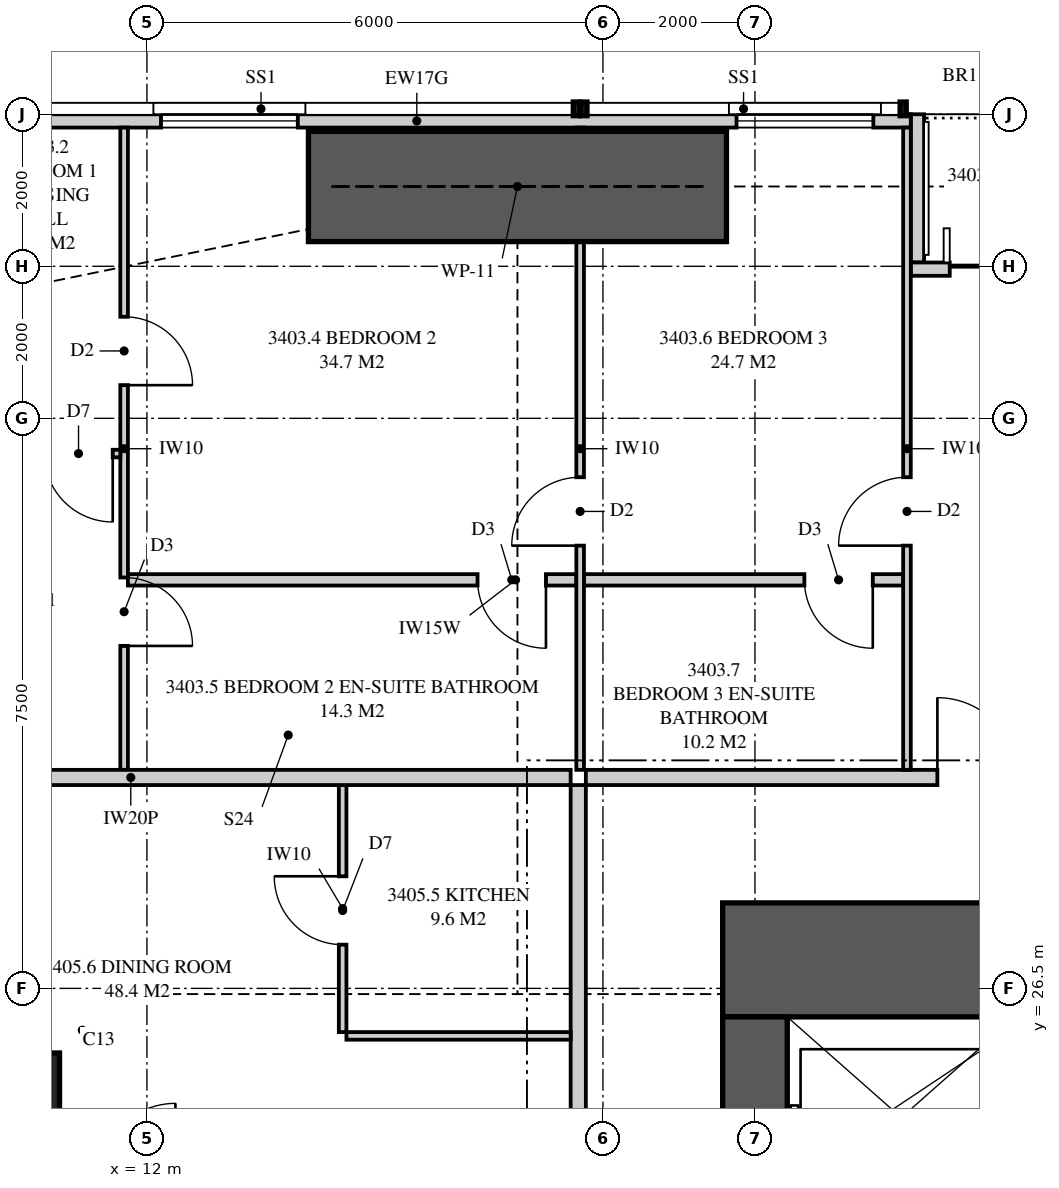
"""IFC4 building model, lengths in metres.
Left out: names, types, materials, properties, quantities, classifications, styles, units other than length and angle.
Written with IfcOpenShell. Run it as: python <this file> out.ifc"""

import sys

from ifc_helpers import new_model, si_unit, direction, frame, frame_2d, origin, origin_2d, place, context, subcontext, project, spatial, polyline, rectangle, outline, extrude, element, fill, save


model = new_model("IFC4")
c1 = context("Model", 3, precision=1e-05, world=origin(), true_north=direction((0.0, 1.0)))
c2 = subcontext(c1, "Body", "Model", "MODEL_VIEW")
j1 = project(units=[si_unit("LENGTHUNIT", "METRE"), si_unit("PLANEANGLEUNIT", "RADIAN")], contexts=[c1])
p1 = place(None, origin())
s1 = spatial("IfcSite", under=j1, at=p1, CompositionType="ELEMENT")
p2 = place(p1, origin())
s2 = spatial("IfcBuilding", under=s1, at=p2, CompositionType="ELEMENT")
p3 = place(p2, frame((0.0, 0.0, 124.95)))
s3 = spatial("IfcBuildingStorey", under=s2, at=p3, CompositionType="ELEMENT", Elevation=124.95)
p4 = place(p3, frame((10.2, 25.0, 0.0), z_axis=(0.0, 0.0, 1.0), x_axis=(1.0, 0.0, 0.0)))
e1 = element("IfcColumn", 1, at=p4, inside=s3, PredefinedType="COLUMN", context=c2, shape_type="SweptSolid", body=[
    extrude(rectangle(XDim=1.3, YDim=1.3, at=origin_2d()), origin(), (0.0, 0.0, 1.0), 3.35),
])
p5 = place(p3, frame((26.0, 26.875, 0.0), z_axis=(0.0, 0.0, 1.0), x_axis=(-1.0, 0.0, 0.0)))
e2 = element("IfcWall", 2, at=p5, inside=s3, PredefinedType="SHEAR", context=c2, shape_type="SweptSolid", body=[
    extrude(rectangle(XDim=6.425, YDim=1.5, at=frame_2d((3.212, 0.0))), origin(), (0.0, 0.0, 1.0), 3.35),
])
p6 = place(p5, frame((0.825, 0.0, 0.0)))
e3 = element("IfcOpeningElement", 3, at=p6, cuts=e2, PredefinedType="OPENING", context=c2, shape_type="SweptSolid", body=[
    extrude(rectangle(XDim=0.75, YDim=2.1, at=frame_2d((0.375, 1.05))), frame((0.0, 0.76, 0.0), z_axis=(0.0, -1.0, 0.0), x_axis=(1.0, 0.0, 0.0)), (0.0, 0.0, 1.0), 1.52),
])
p7 = place(p3, frame((20.0, 26.125, 0.0), z_axis=(0.0, 0.0, 1.0), x_axis=(0.0, -1.0, 0.0)))
e4 = element("IfcWall", 4, at=p7, inside=s3, PredefinedType="SHEAR", context=c2, shape_type="SweptSolid", body=[
    extrude(rectangle(XDim=2.825, YDim=0.85, at=frame_2d((1.413, 0.0))), origin(), (0.0, 0.0, 1.0), 3.35),
])
p8 = place(p3, frame((22.05, 37.913, 0.0), z_axis=(0.0, 0.0, 1.0), x_axis=(-1.0, 0.0, 0.0)))
e5 = element("IfcWall", 5, at=p8, inside=s3, PredefinedType="SOLIDWALL", context=c2, shape_type="SweptSolid", body=[
    extrude(outline(polyline([(0.0, 0.0), (12.999, 0.0), (12.999, 3.11), (5.378, 3.11), (5.378, 2.15), (5.333, 2.15), (5.333, 3.11), (5.175, 3.11), (5.175, 2.15), (0.0, 2.15), (0.0, 0.0)])), frame((0.0, 0.087, 0.0), z_axis=(0.0, -1.0, 0.0), x_axis=(1.0, 0.0, 0.0)), (0.0, 0.0, 1.0), 0.175),
])
p9 = place(p8, frame((0.492, 0.0, 0.4)))
e6 = element("IfcOpeningElement", 6, at=p9, cuts=e5, PredefinedType="OPENING", context=c2, shape_type="SweptSolid", body=[
    extrude(rectangle(XDim=1.8, YDim=1.7, at=frame_2d((0.9, 0.85))), frame((0.0, 0.097, 0.0), z_axis=(0.0, -1.0, 0.0), x_axis=(1.0, 0.0, 0.0)), (0.0, 0.0, 1.0), 0.195),
])
p10 = place(p8, frame((8.065, 0.0, 0.4)))
e7 = element("IfcOpeningElement", 7, at=p10, cuts=e5, PredefinedType="OPENING", context=c2, shape_type="SweptSolid", body=[
    extrude(rectangle(XDim=1.8, YDim=1.7, at=frame_2d((0.9, 0.85))), frame((0.0, 0.097, 0.0), z_axis=(0.0, -1.0, 0.0), x_axis=(1.0, 0.0, 0.0)), (0.0, 0.0, 1.0), 0.195),
])
p11 = place(p3, frame((24.875, 35.962, 0.0), z_axis=(0.0, 0.0, 1.0), x_axis=(-1.0, 0.0, 0.0)))
e8 = element("IfcWall", 8, at=p11, inside=s3, PredefinedType="SOLIDWALL", context=c2, shape_type="SweptSolid", body=[
    extrude(rectangle(XDim=2.825, YDim=0.175, at=frame_2d((1.413, 0.0))), origin(), (0.0, 0.0, 1.0), 3.11),
])
p12 = place(p11, frame((0.512, 0.0, 0.0)))
e9 = element("IfcOpeningElement", 9, at=p12, cuts=e8, PredefinedType="OPENING", context=c2, shape_type="SweptSolid", body=[
    extrude(rectangle(XDim=1.8, YDim=2.1, at=frame_2d((0.9, 1.05))), frame((0.0, 0.097, 0.0), z_axis=(0.0, -1.0, 0.0), x_axis=(1.0, 0.0, 0.0)), (0.0, 0.0, 1.0), 0.195),
])
p13 = place(p3, frame((22.137, 38.0, 0.0), z_axis=(0.0, 0.0, 1.0), x_axis=(0.0, -1.0, 0.0)))
e10 = element("IfcWall", 10, at=p13, inside=s3, PredefinedType="SOLIDWALL", context=c2, shape_type="SweptSolid", body=[
    extrude(outline(polyline([(0.0, 0.0), (1.95, 0.0), (1.95, 3.11), (1.75, 3.11), (1.75, 2.15), (0.15, 2.15), (0.15, 3.11), (0.0, 3.11), (0.0, 0.0)])), frame((0.0, 0.087, 0.0), z_axis=(0.0, -1.0, 0.0), x_axis=(1.0, 0.0, 0.0)), (0.0, 0.0, 1.0), 0.175),
])
p14 = place(p3, frame((17.775, 29.275, 0.0), z_axis=(0.0, 0.0, 1.0), x_axis=(1.0, 0.0, 0.0)))
e11 = element("IfcWall", 11, at=p14, inside=s3, PredefinedType="PARTITIONING", context=c2, shape_type="SweptSolid", body=[
    extrude(outline(polyline([(0.0, 0.0), (11.425, 0.0), (11.425, 3.11), (10.312, 3.11), (10.312, 2.541), (9.638, 2.541), (9.638, 3.11), (0.0, 3.11), (0.0, 0.0)])), frame((0.0, 0.1, 0.0), z_axis=(0.0, -1.0, 0.0), x_axis=(1.0, 0.0, 0.0)), (0.0, 0.0, 1.0), 0.2),
])
p15 = place(p14, frame((4.625, 0.0, 0.0)))
e12 = element("IfcOpeningElement", 12, at=p15, cuts=e11, PredefinedType="OPENING", context=c2, shape_type="SweptSolid", body=[
    extrude(rectangle(XDim=1.05, YDim=2.2, at=frame_2d((0.525, 1.1))), frame((0.0, 0.11, 0.0), z_axis=(0.0, -1.0, 0.0), x_axis=(1.0, 0.0, 0.0)), (0.0, 0.0, 1.0), 0.22),
])
p16 = place(p3, frame((11.7, 37.825, 0.0), z_axis=(0.0, 0.0, 1.0), x_axis=(0.0, -1.0, 0.0)))
e13 = element("IfcWall", 13, at=p16, inside=s3, PredefinedType="PARTITIONING", context=c2, shape_type="SweptSolid", body=[
    extrude(outline(polyline([(0.0, 0.0), (8.45, 0.0), (8.45, 3.11), (2.708, 3.11), (2.708, 2.15), (0.953, 2.15), (0.953, 3.11), (0.0, 3.11), (0.0, 0.0)])), frame((0.0, 0.05, 0.0), z_axis=(0.0, -1.0, 0.0), x_axis=(1.0, 0.0, 0.0)), (0.0, 0.0, 1.0), 0.1),
])
p17 = place(p16, frame((2.489, 0.0, 0.0)))
e14 = element("IfcOpeningElement", 14, at=p17, cuts=e13, PredefinedType="OPENING", context=c2, shape_type="SweptSolid", body=[
    extrude(rectangle(XDim=0.9, YDim=2.1, at=frame_2d((0.45, 1.05))), frame((0.0, 0.06, 0.0), z_axis=(0.0, -1.0, 0.0), x_axis=(1.0, 0.0, 0.0)), (0.0, 0.0, 1.0), 0.12),
])
p18 = place(p16, frame((5.919, 0.0, 0.0)))
e15 = element("IfcOpeningElement", 15, at=p18, cuts=e13, PredefinedType="OPENING", context=c2, shape_type="SweptSolid", body=[
    extrude(rectangle(XDim=0.9, YDim=2.1, at=frame_2d((0.45, 1.05))), frame((0.0, 0.06, 0.0), z_axis=(0.0, -1.0, 0.0), x_axis=(1.0, 0.0, 0.0)), (0.0, 0.0, 1.0), 0.12),
])
p19 = place(p3, frame((17.7, 37.825, 0.0), z_axis=(0.0, 0.0, 1.0), x_axis=(0.0, -1.0, 0.0)))
e16 = element("IfcWall", 16, at=p19, inside=s3, PredefinedType="PARTITIONING", context=c2, shape_type="SweptSolid", body=[
    extrude(outline(polyline([(1.635, 2.15), (0.0, 2.15), (0.0, 0.0), (8.45, 0.0), (8.45, 3.11), (1.635, 3.11), (1.635, 2.15)]), holes=[polyline([(1.021, 0.116), (0.529, 0.116), (0.529, 0.906), (1.021, 0.906), (1.021, 0.116)]), polyline([(1.021, 1.244), (0.529, 1.244), (0.529, 2.034), (1.021, 2.034), (1.021, 1.244)])]), frame((0.0, 0.05, 0.0), z_axis=(0.0, -1.0, 0.0), x_axis=(1.0, 0.0, 0.0)), (0.0, 0.0, 1.0), 0.1),
])
p20 = place(p19, frame((4.6, 0.0, 0.0)))
e17 = element("IfcOpeningElement", 17, at=p20, cuts=e16, PredefinedType="OPENING", context=c2, shape_type="SweptSolid", body=[
    extrude(rectangle(XDim=0.9, YDim=2.1, at=frame_2d((0.45, 1.05))), frame((0.0, 0.06, 0.0), z_axis=(0.0, -1.0, 0.0), x_axis=(1.0, 0.0, 0.0)), (0.0, 0.0, 1.0), 0.12),
])
p21 = place(p3, frame((22.0, 37.825, 0.0), z_axis=(0.0, 0.0, 1.0), x_axis=(0.0, -1.0, 0.0)))
e18 = element("IfcWall", 18, at=p21, inside=s3, PredefinedType="PARTITIONING", context=c2, shape_type="SweptSolid", body=[
    extrude(outline(polyline([(0.0, 0.0), (8.45, 0.0), (8.45, 3.11), (1.635, 3.11), (1.635, 2.15), (0.0, 2.15), (0.0, 3.11), (0.0, 0.0)])), frame((0.0, 0.05, 0.0), z_axis=(0.0, -1.0, 0.0), x_axis=(1.0, 0.0, 0.0)), (0.0, 0.0, 1.0), 0.1),
])
p22 = place(p21, frame((4.6, 0.0, 0.0)))
e19 = element("IfcOpeningElement", 19, at=p22, cuts=e18, PredefinedType="OPENING", context=c2, shape_type="SweptSolid", body=[
    extrude(rectangle(XDim=0.9, YDim=2.1, at=frame_2d((0.45, 1.05))), frame((0.0, 0.06, 0.0), z_axis=(0.0, -1.0, 0.0), x_axis=(1.0, 0.0, 0.0)), (0.0, 0.0, 1.0), 0.12),
])
p23 = place(p3, frame((6.0, 33.536, 0.0), z_axis=(0.0, 0.0, 1.0), x_axis=(1.0, 0.0, 0.0)))
e20 = element("IfcWall", 20, at=p23, inside=s3, PredefinedType="PARTITIONING", context=c2, shape_type="SweptSolid", body=[
    extrude(outline(polyline([(0.0, 0.0), (5.65, 0.0), (5.65, 3.11), (5.46, 3.11), (5.46, 2.51), (3.206, 2.51), (3.206, 2.15), (1.463, 2.15), (1.463, 3.11), (0.0, 3.11), (0.0, 0.0)])), frame((0.0, 0.05, 0.0), z_axis=(0.0, -1.0, 0.0), x_axis=(1.0, 0.0, 0.0)), (0.0, 0.0, 1.0), 0.1),
])
p24 = place(p23, frame((4.65, 0.0, 0.0)))
e21 = element("IfcOpeningElement", 21, at=p24, cuts=e20, PredefinedType="OPENING", context=c2, shape_type="SweptSolid", body=[
    extrude(rectangle(XDim=0.9, YDim=2.1, at=frame_2d((0.45, 1.05))), frame((0.0, 0.06, 0.0), z_axis=(0.0, -1.0, 0.0), x_axis=(1.0, 0.0, 0.0)), (0.0, 0.0, 1.0), 0.12),
])
p25 = place(p3, frame((11.75, 31.875, 0.0), z_axis=(0.0, 0.0, 1.0), x_axis=(1.0, 0.0, 0.0)))
e22 = element("IfcWall", 22, at=p25, inside=s3, PredefinedType="PLUMBINGWALL", context=c2, shape_type="SweptSolid", body=[
    extrude(outline(polyline([(0.0, 0.0), (5.9, 0.0), (5.9, 3.11), (5.438, 3.11), (5.438, 2.541), (4.812, 2.541), (4.812, 3.11), (0.0, 3.11), (0.0, 0.0)])), frame((0.0, 0.075, 0.0), z_axis=(0.0, -1.0, 0.0), x_axis=(1.0, 0.0, 0.0)), (0.0, 0.0, 1.0), 0.15),
])
p26 = place(p25, frame((4.6, 0.0, 0.0)))
e23 = element("IfcOpeningElement", 23, at=p26, cuts=e22, PredefinedType="OPENING", context=c2, shape_type="SweptSolid", body=[
    extrude(rectangle(XDim=0.9, YDim=2.1, at=frame_2d((0.45, 1.05))), frame((0.0, 0.085, 0.0), z_axis=(0.0, -1.0, 0.0), x_axis=(1.0, 0.0, 0.0)), (0.0, 0.0, 1.0), 0.17),
])
p27 = place(p3, frame((17.75, 31.875, 0.0), z_axis=(0.0, 0.0, 1.0), x_axis=(1.0, 0.0, 0.0)))
e24 = element("IfcWall", 24, at=p27, inside=s3, PredefinedType="PLUMBINGWALL", context=c2, shape_type="SweptSolid", body=[
    extrude(rectangle(XDim=4.2, YDim=0.15, at=frame_2d((2.1, 0.0))), origin(), (0.0, 0.0, 1.0), 3.11),
])
p28 = place(p27, frame((2.9, 0.0, 0.0)))
e25 = element("IfcOpeningElement", 25, at=p28, cuts=e24, PredefinedType="OPENING", context=c2, shape_type="SweptSolid", body=[
    extrude(rectangle(XDim=0.9, YDim=2.1, at=frame_2d((0.45, 1.05))), frame((0.0, 0.085, 0.0), z_axis=(0.0, -1.0, 0.0), x_axis=(1.0, 0.0, 0.0)), (0.0, 0.0, 1.0), 0.17),
])
p29 = place(p3, frame((6.0, 29.275, 0.0), z_axis=(0.0, 0.0, 1.0), x_axis=(1.0, 0.0, 0.0)))
e26 = element("IfcWall", 26, at=p29, inside=s3, PredefinedType="PARTITIONING", context=c2, shape_type="SweptSolid", body=[
    extrude(outline(polyline([(0.0, 0.0), (11.575, 0.0), (11.575, 3.11), (11.212, 3.11), (11.212, 2.541), (10.538, 2.541), (10.538, 3.11), (5.51, 3.11), (5.51, 2.51), (2.969, 2.51), (2.969, 2.541), (2.565, 2.541), (2.565, 2.15), (0.721, 2.15), (0.721, 3.11), (0.0, 3.11), (0.0, 0.0)])), frame((0.0, 0.1, 0.0), z_axis=(0.0, -1.0, 0.0), x_axis=(1.0, 0.0, 0.0)), (0.0, 0.0, 1.0), 0.2),
])
p30 = place(p3, frame((14.575, 25.925, 0.0), z_axis=(0.0, 0.0, 1.0), x_axis=(0.0, 1.0, 0.0)))
e27 = element("IfcWall", 27, at=p30, inside=s3, PredefinedType="PARTITIONING", context=c2, shape_type="SweptSolid", body=[
    extrude(outline(polyline([(0.0, 0.0), (3.25, 0.0), (3.25, 3.11), (0.787, 3.11), (0.787, 2.541), (0.213, 2.541), (0.213, 3.11), (0.0, 3.11), (0.0, 0.0)])), frame((0.0, 0.05, 0.0), z_axis=(0.0, -1.0, 0.0), x_axis=(1.0, 0.0, 0.0)), (0.0, 0.0, 1.0), 0.1),
])
p31 = place(p30, frame((1.15, 0.0, 0.0)))
e28 = element("IfcOpeningElement", 28, at=p31, cuts=e27, PredefinedType="OPENING", context=c2, shape_type="SweptSolid", body=[
    extrude(rectangle(XDim=0.9, YDim=2.1, at=frame_2d((0.45, 1.05))), frame((0.0, 0.06, 0.0), z_axis=(0.0, -1.0, 0.0), x_axis=(1.0, 0.0, 0.0)), (0.0, 0.0, 1.0), 0.12),
])
p32 = place(p3, frame((14.625, 25.875, 0.0), z_axis=(0.0, 0.0, 1.0), x_axis=(1.0, 0.0, 0.0)))
e29 = element("IfcWall", 29, at=p32, inside=s3, PredefinedType="PARTITIONING", context=c2, shape_type="SweptSolid", body=[
    extrude(rectangle(XDim=2.95, YDim=0.1, at=frame_2d((1.475, 0.0))), origin(), (0.0, 0.0, 1.0), 3.11),
])
p33 = place(p3, frame((17.675, 23.613, 0.0), z_axis=(0.0, 0.0, 1.0), x_axis=(0.0, 1.0, 0.0)))
e30 = element("IfcWall", 30, at=p33, inside=s3, PredefinedType="PARTITIONING", context=c2, shape_type="SweptSolid", body=[
    extrude(outline(polyline([(0.0, 0.0), (5.562, 0.0), (5.562, 3.11), (3.15, 3.11), (3.15, 2.541), (2.475, 2.541), (2.475, 3.11), (0.0, 3.11), (0.0, 0.0)])), frame((0.0, 0.1, 0.0), z_axis=(0.0, -1.0, 0.0), x_axis=(1.0, 0.0, 0.0)), (0.0, 0.0, 1.0), 0.2),
])
p34 = place(p3, frame((14.125, 37.05, 0.0), z_axis=(0.0, 0.0, 1.0), x_axis=(1.0, 0.0, 0.0)))
e31 = element("IfcWall", 31, at=p34, inside=s3, PredefinedType="SHEAR", context=c2, shape_type="SweptSolid", body=[
    extrude(rectangle(XDim=5.5, YDim=1.45, at=frame_2d((2.75, 0.0))), origin(), (0.0, 0.0, 1.0), 3.35),
])
p35 = place(p12, origin())
e32 = element("IfcDoor", 32, at=p35, inside=s3, OperationType="SLIDING_TO_LEFT", PredefinedType="DOOR", context=c2, shape_type="SweptSolid", body=[
    extrude(rectangle(XDim=1.8, YDim=2.1, at=frame_2d((0.9, 1.05))), frame((0.0, 0.025, 0.0), z_axis=(0.0, -1.0, 0.0), x_axis=(1.0, 0.0, 0.0)), (0.0, 0.0, 1.0), 0.05),
])
fill(e9, e32)
p36 = place(p9, origin())
e33 = element("IfcWindow", 33, at=p36, inside=s3, PartitioningType="SINGLE_PANEL", PredefinedType="WINDOW", context=c2, shape_type="SweptSolid", body=[
    extrude(rectangle(XDim=1.8, YDim=1.7, at=frame_2d((0.9, 0.85))), frame((0.0, 0.03, 0.0), z_axis=(0.0, -1.0, 0.0), x_axis=(1.0, 0.0, 0.0)), (0.0, 0.0, 1.0), 0.06),
])
fill(e6, e33)
p37 = place(p10, origin())
e34 = element("IfcWindow", 34, at=p37, inside=s3, PartitioningType="SINGLE_PANEL", PredefinedType="WINDOW", context=c2, shape_type="SweptSolid", body=[
    extrude(rectangle(XDim=1.8, YDim=1.7, at=frame_2d((0.9, 0.85))), frame((0.0, 0.03, 0.0), z_axis=(0.0, -1.0, 0.0), x_axis=(1.0, 0.0, 0.0)), (0.0, 0.0, 1.0), 0.06),
])
fill(e7, e34)
p38 = place(p15, origin())
e35 = element("IfcDoor", 35, at=p38, inside=s3, OperationType="SINGLE_SWING_LEFT", PredefinedType="DOOR", context=c2, shape_type="SweptSolid", body=[
    extrude(rectangle(XDim=1.05, YDim=2.2, at=frame_2d((0.525, 1.1))), frame((0.0, 0.025, 0.0), z_axis=(0.0, -1.0, 0.0), x_axis=(1.0, 0.0, 0.0)), (0.0, 0.0, 1.0), 0.05),
])
fill(e12, e35)
p39 = place(p24, frame((0.9, 0.0, 0.0), z_axis=(0.0, 0.0, 1.0), x_axis=(-1.0, 0.0, 0.0)))
e36 = element("IfcDoor", 36, at=p39, inside=s3, OperationType="SINGLE_SWING_LEFT", PredefinedType="DOOR", context=c2, shape_type="SweptSolid", body=[
    extrude(rectangle(XDim=0.9, YDim=2.1, at=frame_2d((0.45, 1.05))), frame((0.0, 0.025, 0.0), z_axis=(0.0, -1.0, 0.0), x_axis=(1.0, 0.0, 0.0)), (0.0, 0.0, 1.0), 0.05),
])
fill(e21, e36)
p40 = place(p17, origin())
e37 = element("IfcDoor", 37, at=p40, inside=s3, OperationType="SINGLE_SWING_RIGHT", PredefinedType="DOOR", context=c2, shape_type="SweptSolid", body=[
    extrude(rectangle(XDim=0.9, YDim=2.1, at=frame_2d((0.45, 1.05))), frame((0.0, 0.025, 0.0), z_axis=(0.0, -1.0, 0.0), x_axis=(1.0, 0.0, 0.0)), (0.0, 0.0, 1.0), 0.05),
])
fill(e14, e37)
p41 = place(p20, frame((0.9, 0.0, 0.0), z_axis=(0.0, 0.0, 1.0), x_axis=(-1.0, 0.0, 0.0)))
e38 = element("IfcDoor", 38, at=p41, inside=s3, OperationType="SINGLE_SWING_LEFT", PredefinedType="DOOR", context=c2, shape_type="SweptSolid", body=[
    extrude(rectangle(XDim=0.9, YDim=2.1, at=frame_2d((0.45, 1.05))), frame((0.0, 0.025, 0.0), z_axis=(0.0, -1.0, 0.0), x_axis=(1.0, 0.0, 0.0)), (0.0, 0.0, 1.0), 0.05),
])
fill(e17, e38)
p42 = place(p26, frame((0.9, 0.0, 0.0), z_axis=(0.0, 0.0, 1.0), x_axis=(-1.0, 0.0, 0.0)))
e39 = element("IfcDoor", 39, at=p42, inside=s3, OperationType="SINGLE_SWING_LEFT", PredefinedType="DOOR", context=c2, shape_type="SweptSolid", body=[
    extrude(rectangle(XDim=0.9, YDim=2.1, at=frame_2d((0.45, 1.05))), frame((0.0, 0.025, 0.0), z_axis=(0.0, -1.0, 0.0), x_axis=(1.0, 0.0, 0.0)), (0.0, 0.0, 1.0), 0.05),
])
fill(e23, e39)
p43 = place(p22, frame((0.9, 0.0, 0.0), z_axis=(0.0, 0.0, 1.0), x_axis=(-1.0, 0.0, 0.0)))
e40 = element("IfcDoor", 40, at=p43, inside=s3, OperationType="SINGLE_SWING_LEFT", PredefinedType="DOOR", context=c2, shape_type="SweptSolid", body=[
    extrude(rectangle(XDim=0.9, YDim=2.1, at=frame_2d((0.45, 1.05))), frame((0.0, 0.025, 0.0), z_axis=(0.0, -1.0, 0.0), x_axis=(1.0, 0.0, 0.0)), (0.0, 0.0, 1.0), 0.05),
])
fill(e19, e40)
p44 = place(p28, frame((0.9, 0.0, 0.0), z_axis=(0.0, 0.0, 1.0), x_axis=(-1.0, 0.0, 0.0)))
e41 = element("IfcDoor", 41, at=p44, inside=s3, OperationType="SINGLE_SWING_LEFT", PredefinedType="DOOR", context=c2, shape_type="SweptSolid", body=[
    extrude(rectangle(XDim=0.9, YDim=2.1, at=frame_2d((0.45, 1.05))), frame((0.0, 0.025, 0.0), z_axis=(0.0, -1.0, 0.0), x_axis=(1.0, 0.0, 0.0)), (0.0, 0.0, 1.0), 0.05),
])
fill(e25, e41)
p45 = place(p18, origin())
e42 = element("IfcDoor", 42, at=p45, inside=s3, OperationType="SINGLE_SWING_RIGHT", PredefinedType="DOOR", context=c2, shape_type="SweptSolid", body=[
    extrude(rectangle(XDim=0.9, YDim=2.1, at=frame_2d((0.45, 1.05))), frame((0.0, 0.025, 0.0), z_axis=(0.0, -1.0, 0.0), x_axis=(1.0, 0.0, 0.0)), (0.0, 0.0, 1.0), 0.05),
])
fill(e15, e42)
p46 = place(p31, origin())
e43 = element("IfcDoor", 43, at=p46, inside=s3, OperationType="SINGLE_SWING_RIGHT", PredefinedType="DOOR", context=c2, shape_type="SweptSolid", body=[
    extrude(rectangle(XDim=0.9, YDim=2.1, at=frame_2d((0.45, 1.05))), frame((0.0, 0.025, 0.0), z_axis=(0.0, -1.0, 0.0), x_axis=(1.0, 0.0, 0.0)), (0.0, 0.0, 1.0), 0.05),
])
fill(e28, e43)
save(model, sys.argv[1])
